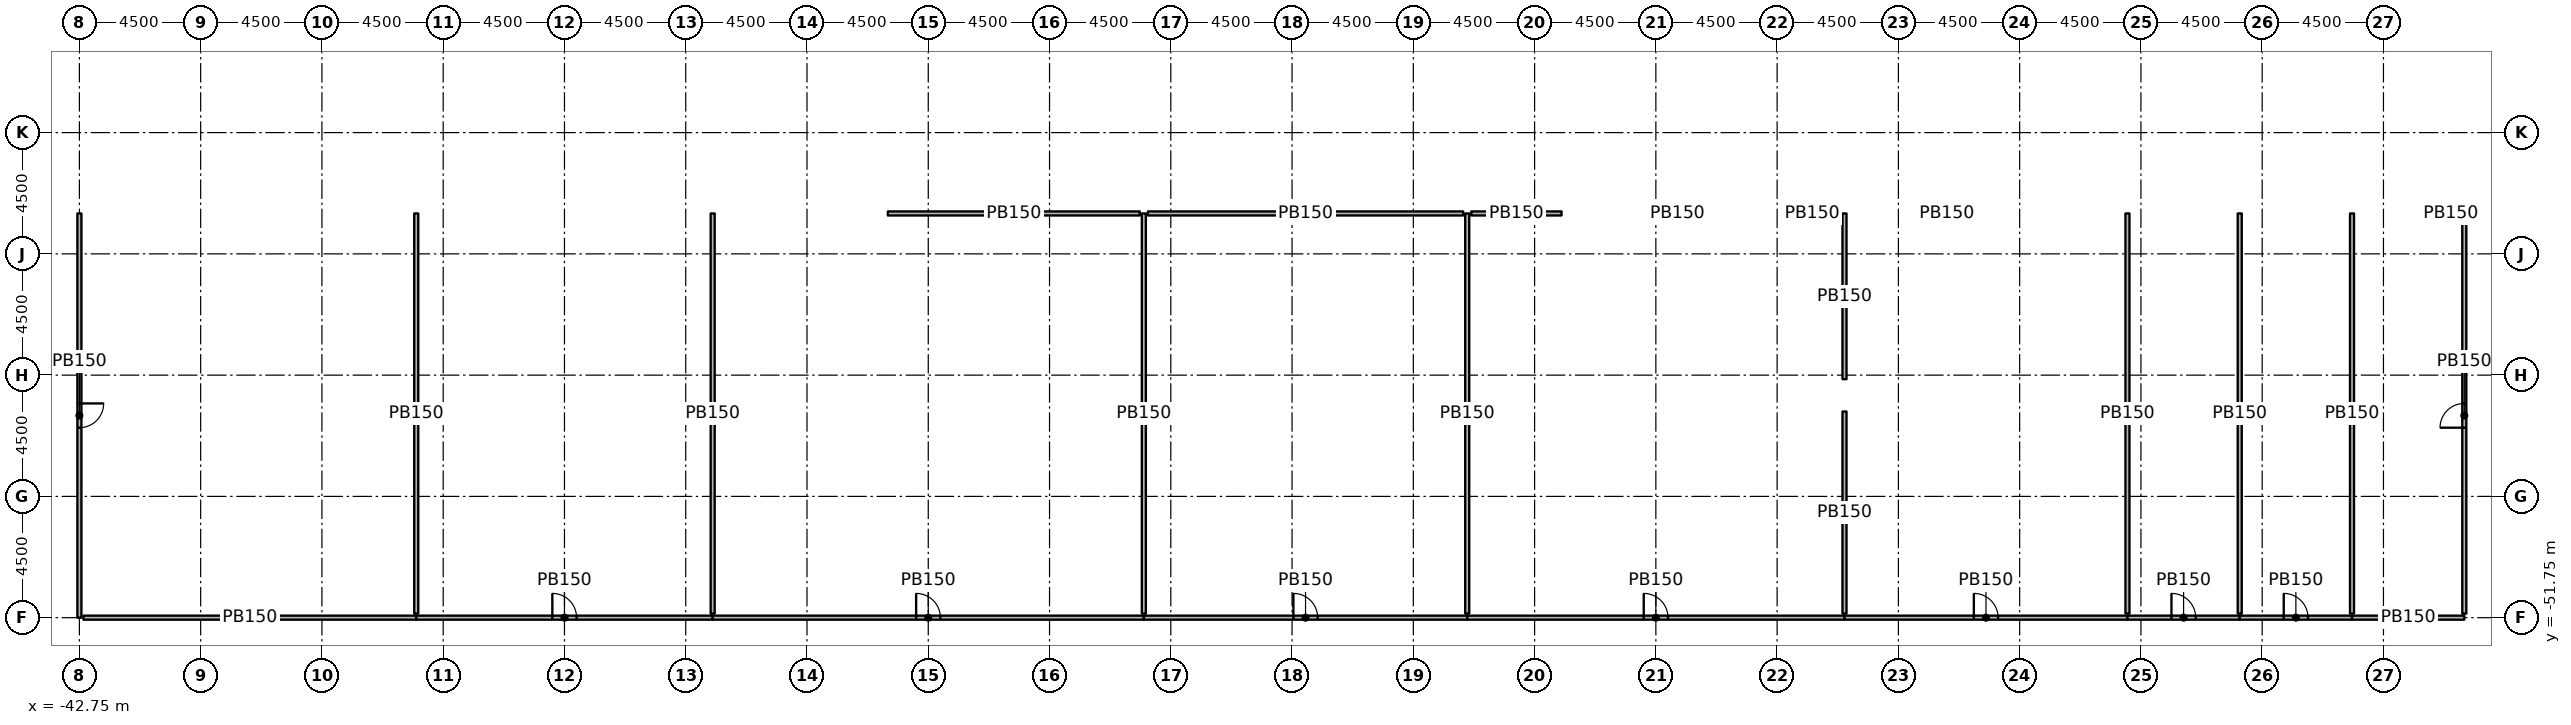
"""IFC4 building model, lengths in metres.
Left out: names, types, materials, properties, quantities, classifications, styles, units other than length and angle.
Written with IfcOpenShell. Run it as: python <this file> out.ifc"""

import sys

from ifc_helpers import new_model, si_unit, direction, frame, frame_2d, origin, origin_2d, place, context, subcontext, project, spatial, rectangle, extrude, element, fill, save


model = new_model("IFC4")
c1 = context("Model", 3, precision=1e-05, world=origin(), true_north=direction((0.0, 1.0)))
c2 = subcontext(c1, "Body", "Model", "MODEL_VIEW")
j1 = project(units=[si_unit("LENGTHUNIT", "METRE"), si_unit("PLANEANGLEUNIT", "RADIAN")], contexts=[c1])
p1 = place(None, origin())
s1 = spatial("IfcSite", under=j1, at=p1, CompositionType="ELEMENT")
p2 = place(p1, origin())
s2 = spatial("IfcBuilding", under=s1, at=p2, CompositionType="ELEMENT")
p3 = place(p2, frame((0.0, 0.0, -4.0)))
s3 = spatial("IfcBuildingStorey", under=s2, at=p3, CompositionType="ELEMENT", Elevation=-4.0)
for number, where, z_axis, x_axis in (
    (1, (-40.5, -43.5, 0.0), (0.0, 0.0, 1.0), (1.0, 0.0, 0.0)),
    (2, (-31.5, -43.5, 0.0), (0.0, 0.0, 1.0), (1.0, 0.0, 0.0)),
    (3, (-22.5, -43.5, 0.0), (0.0, 0.0, 1.0), (1.0, 0.0, 0.0)),
    (4, (-13.5, -43.5, 0.0), (0.0, 0.0, 1.0), (1.0, 0.0, 0.0)),
    (5, (-4.5, -43.5, 0.0), (0.0, 0.0, 1.0), (1.0, 0.0, 0.0)),
    (6, (-2.25, -33.11, 0.0), (0.0, 0.0, 1.0), (1.0, 0.0, 0.0)),
    (7, (2.25, -33.11, 0.0), (0.0, 0.0, 1.0), (1.0, 0.0, 0.0)),
    (8, (4.5, -43.5, 0.0), (0.0, 0.0, 1.0), (1.0, 0.0, 0.0)),
    (9, (13.5, -43.5, 0.0), (0.0, 0.0, 1.0), (1.0, 0.0, 0.0)),
    (10, (22.5, -43.5, 0.0), (0.0, 0.0, 1.0), (1.0, 0.0, 0.0)),
    (11, (31.5, -43.5, 0.0), (0.0, 0.0, 1.0), (1.0, 0.0, 0.0)),
    (12, (40.5, -43.5, 0.0), (0.0, 0.0, 1.0), (1.0, 0.0, 0.0)),
):
    element("IfcColumn", number, at=place(p3, frame(where, z_axis=z_axis, x_axis=x_axis)), inside=s3, PredefinedType="COLUMN", context=c2, shape_type="SweptSolid", body=[
        extrude(rectangle(XDim=1.2, YDim=1.2, at=origin_2d()), origin(), (0.0, 0.0, 1.0), 3.1),
    ])
p4 = place(p3, frame((-42.75, -36.75, 0.0), z_axis=(0.0, 0.0, 1.0), x_axis=(0.0, -1.0, 0.0)))
e13 = element("IfcWall", 13, at=p4, inside=s3, PredefinedType="PARTITIONING", context=c2, shape_type="SweptSolid", body=[
    extrude(rectangle(XDim=15.0, YDim=0.15, at=frame_2d((7.5, 0.0))), origin(), (0.0, 0.0, 1.0), 3.1),
])
p5 = place(p4, frame((7.05, 0.0, 0.0)))
e14 = element("IfcOpeningElement", 14, at=p5, cuts=e13, PredefinedType="OPENING", context=c2, shape_type="SweptSolid", body=[
    extrude(rectangle(XDim=0.9, YDim=2.1, at=frame_2d((0.45, 1.05))), frame((0.0, 0.085, 0.0), z_axis=(0.0, -1.0, 0.0), x_axis=(1.0, 0.0, 0.0)), (0.0, 0.0, 1.0), 0.17),
])
p6 = place(p3, frame((-42.6, -51.75, 0.0), z_axis=(0.0, 0.0, 1.0), x_axis=(1.0, 0.0, 0.0)))
e15 = element("IfcWall", 15, at=p6, inside=s3, PredefinedType="PARTITIONING", context=c2, shape_type="SweptSolid", body=[
    extrude(rectangle(XDim=12.35, YDim=0.15, at=frame_2d((6.175, 0.0))), origin(), (0.0, 0.0, 1.0), 3.1),
])
p7 = place(p3, frame((-30.25, -51.75, 0.0), z_axis=(0.0, 0.0, 1.0), x_axis=(1.0, 0.0, 0.0)))
e16 = element("IfcWall", 16, at=p7, inside=s3, PredefinedType="PARTITIONING", context=c2, shape_type="SweptSolid", body=[
    extrude(rectangle(XDim=11.0, YDim=0.15, at=frame_2d((5.5, 0.0))), origin(), (0.0, 0.0, 1.0), 3.1),
])
p8 = place(p7, frame((5.05, 0.0, 0.0)))
e17 = element("IfcOpeningElement", 17, at=p8, cuts=e16, PredefinedType="OPENING", context=c2, shape_type="SweptSolid", body=[
    extrude(rectangle(XDim=0.9, YDim=2.1, at=frame_2d((0.45, 1.05))), frame((0.0, 0.085, 0.0), z_axis=(0.0, -1.0, 0.0), x_axis=(1.0, 0.0, 0.0)), (0.0, 0.0, 1.0), 0.17),
])
p9 = place(p3, frame((-19.25, -51.75, 0.0), z_axis=(0.0, 0.0, 1.0), x_axis=(1.0, 0.0, 0.0)))
e18 = element("IfcWall", 18, at=p9, inside=s3, PredefinedType="PARTITIONING", context=c2, shape_type="SweptSolid", body=[
    extrude(rectangle(XDim=16.0, YDim=0.15, at=frame_2d((8.0, 0.0))), origin(), (0.0, 0.0, 1.0), 3.1),
])
p10 = place(p9, frame((7.55, 0.0, 0.0)))
e19 = element("IfcOpeningElement", 19, at=p10, cuts=e18, PredefinedType="OPENING", context=c2, shape_type="SweptSolid", body=[
    extrude(rectangle(XDim=0.9, YDim=2.1, at=frame_2d((0.45, 1.05))), frame((0.0, 0.085, 0.0), z_axis=(0.0, -1.0, 0.0), x_axis=(1.0, 0.0, 0.0)), (0.0, 0.0, 1.0), 0.17),
])
p11 = place(p3, frame((-3.25, -51.75, 0.0), z_axis=(0.0, 0.0, 1.0), x_axis=(1.0, 0.0, 0.0)))
e20 = element("IfcWall", 20, at=p11, inside=s3, PredefinedType="PARTITIONING", context=c2, shape_type="SweptSolid", body=[
    extrude(rectangle(XDim=12.0, YDim=0.15, at=frame_2d((6.0, 0.0))), origin(), (0.0, 0.0, 1.0), 3.1),
])
p12 = place(p11, frame((5.55, 0.0, 0.0)))
e21 = element("IfcOpeningElement", 21, at=p12, cuts=e20, PredefinedType="OPENING", context=c2, shape_type="SweptSolid", body=[
    extrude(rectangle(XDim=0.9, YDim=2.1, at=frame_2d((0.45, 1.05))), frame((0.0, 0.085, 0.0), z_axis=(0.0, -1.0, 0.0), x_axis=(1.0, 0.0, 0.0)), (0.0, 0.0, 1.0), 0.17),
])
p13 = place(p3, frame((8.75, -51.75, 0.0), z_axis=(0.0, 0.0, 1.0), x_axis=(1.0, 0.0, 0.0)))
e22 = element("IfcWall", 22, at=p13, inside=s3, PredefinedType="PARTITIONING", context=c2, shape_type="SweptSolid", body=[
    extrude(rectangle(XDim=14.0, YDim=0.15, at=frame_2d((7.0, 0.0))), origin(), (0.0, 0.0, 1.0), 3.1),
])
p14 = place(p13, frame((6.55, 0.0, 0.0)))
e23 = element("IfcOpeningElement", 23, at=p14, cuts=e22, PredefinedType="OPENING", context=c2, shape_type="SweptSolid", body=[
    extrude(rectangle(XDim=0.9, YDim=2.1, at=frame_2d((0.45, 1.05))), frame((0.0, 0.085, 0.0), z_axis=(0.0, -1.0, 0.0), x_axis=(1.0, 0.0, 0.0)), (0.0, 0.0, 1.0), 0.17),
])
p15 = place(p3, frame((22.75, -51.75, 0.0), z_axis=(0.0, 0.0, 1.0), x_axis=(1.0, 0.0, 0.0)))
e24 = element("IfcWall", 24, at=p15, inside=s3, PredefinedType="PARTITIONING", context=c2, shape_type="SweptSolid", body=[
    extrude(rectangle(XDim=10.5, YDim=0.15, at=frame_2d((5.25, 0.0))), origin(), (0.0, 0.0, 1.0), 3.1),
])
p16 = place(p15, frame((4.8, 0.0, 0.0)))
e25 = element("IfcOpeningElement", 25, at=p16, cuts=e24, PredefinedType="OPENING", context=c2, shape_type="SweptSolid", body=[
    extrude(rectangle(XDim=0.9, YDim=2.1, at=frame_2d((0.45, 1.05))), frame((0.0, 0.085, 0.0), z_axis=(0.0, -1.0, 0.0), x_axis=(1.0, 0.0, 0.0)), (0.0, 0.0, 1.0), 0.17),
])
p17 = place(p3, frame((33.25, -51.75, 0.0), z_axis=(0.0, 0.0, 1.0), x_axis=(1.0, 0.0, 0.0)))
e26 = element("IfcWall", 26, at=p17, inside=s3, PredefinedType="PARTITIONING", context=c2, shape_type="SweptSolid", body=[
    extrude(rectangle(XDim=4.167, YDim=0.15, at=frame_2d((2.083, 0.0))), origin(), (0.0, 0.0, 1.0), 3.1),
])
p18 = place(p17, frame((1.633, 0.0, 0.0)))
e27 = element("IfcOpeningElement", 27, at=p18, cuts=e26, PredefinedType="OPENING", context=c2, shape_type="SweptSolid", body=[
    extrude(rectangle(XDim=0.9, YDim=2.1, at=frame_2d((0.45, 1.05))), frame((0.0, 0.085, 0.0), z_axis=(0.0, -1.0, 0.0), x_axis=(1.0, 0.0, 0.0)), (0.0, 0.0, 1.0), 0.17),
])
p19 = place(p3, frame((37.417, -51.75, 0.0), z_axis=(0.0, 0.0, 1.0), x_axis=(1.0, 0.0, 0.0)))
e28 = element("IfcWall", 28, at=p19, inside=s3, PredefinedType="PARTITIONING", context=c2, shape_type="SweptSolid", body=[
    extrude(rectangle(XDim=4.167, YDim=0.15, at=frame_2d((2.083, 0.0))), origin(), (0.0, 0.0, 1.0), 3.1),
])
p20 = place(p19, frame((1.633, 0.0, 0.0)))
e29 = element("IfcOpeningElement", 29, at=p20, cuts=e28, PredefinedType="OPENING", context=c2, shape_type="SweptSolid", body=[
    extrude(rectangle(XDim=0.9, YDim=2.1, at=frame_2d((0.45, 1.05))), frame((0.0, 0.085, 0.0), z_axis=(0.0, -1.0, 0.0), x_axis=(1.0, 0.0, 0.0)), (0.0, 0.0, 1.0), 0.17),
])
p21 = place(p3, frame((41.583, -51.75, 0.0), z_axis=(0.0, 0.0, 1.0), x_axis=(1.0, 0.0, 0.0)))
e30 = element("IfcWall", 30, at=p21, inside=s3, PredefinedType="PARTITIONING", context=c2, shape_type="SweptSolid", body=[
    extrude(rectangle(XDim=4.167, YDim=0.15, at=frame_2d((2.083, 0.0))), origin(), (0.0, 0.0, 1.0), 3.1),
])
for number, where, z_axis, x_axis in (
    (31, (-30.25, -36.75, 0.0), (0.0, 0.0, 1.0), (0.0, -1.0, 0.0)),
    (32, (-19.25, -36.75, 0.0), (0.0, 0.0, 1.0), (0.0, -1.0, 0.0)),
    (33, (-3.25, -36.75, 0.0), (0.0, 0.0, 1.0), (0.0, -1.0, 0.0)),
):
    element("IfcWall", number, at=place(p3, frame(where, z_axis=z_axis, x_axis=x_axis)), inside=s3, PredefinedType="PARTITIONING", context=c2, shape_type="SweptSolid", body=[
        extrude(rectangle(XDim=14.85, YDim=0.15, at=frame_2d((7.425, 0.0))), origin(), (0.0, 0.0, 1.0), 3.1),
    ])
p22 = place(p3, frame((-12.75, -36.75, 0.0), z_axis=(0.0, 0.0, 1.0), x_axis=(1.0, 0.0, 0.0)))
e34 = element("IfcWall", 34, at=p22, inside=s3, PredefinedType="PARTITIONING", context=c2, shape_type="SweptSolid", body=[
    extrude(rectangle(XDim=9.35, YDim=0.15, at=frame_2d((4.675, 0.0))), origin(), (0.0, 0.0, 1.0), 3.1),
])
p23 = place(p3, frame((8.75, -36.75, 0.0), z_axis=(0.0, 0.0, 1.0), x_axis=(0.0, -1.0, 0.0)))
e35 = element("IfcWall", 35, at=p23, inside=s3, PredefinedType="PARTITIONING", context=c2, shape_type="SweptSolid", body=[
    extrude(rectangle(XDim=14.85, YDim=0.15, at=frame_2d((7.425, 0.0))), origin(), (0.0, 0.0, 1.0), 3.1),
])
p24 = place(p3, frame((-3.1, -36.75, 0.0), z_axis=(0.0, 0.0, 1.0), x_axis=(1.0, 0.0, 0.0)))
e36 = element("IfcWall", 36, at=p24, inside=s3, PredefinedType="PARTITIONING", context=c2, shape_type="SweptSolid", body=[
    extrude(rectangle(XDim=11.7, YDim=0.15, at=frame_2d((5.85, 0.0))), origin(), (0.0, 0.0, 1.0), 3.1),
])
p25 = place(p3, frame((22.75, -36.75, 0.0), z_axis=(0.0, 0.0, 1.0), x_axis=(0.0, -1.0, 0.0)))
e37 = element("IfcWall", 37, at=p25, inside=s3, PredefinedType="PARTITIONING", context=c2, shape_type="SweptSolid", body=[
    extrude(rectangle(XDim=6.15, YDim=0.15, at=frame_2d((3.075, 0.0))), origin(), (0.0, 0.0, 1.0), 3.1),
])
p26 = place(p3, frame((22.75, -44.1, 0.0), z_axis=(0.0, 0.0, 1.0), x_axis=(0.0, -1.0, 0.0)))
e38 = element("IfcWall", 38, at=p26, inside=s3, PredefinedType="PARTITIONING", context=c2, shape_type="SweptSolid", body=[
    extrude(rectangle(XDim=7.5, YDim=0.15, at=frame_2d((3.75, 0.0))), origin(), (0.0, 0.0, 1.0), 3.1),
])
p27 = place(p3, frame((8.9, -36.75, 0.0), z_axis=(0.0, 0.0, 1.0), x_axis=(1.0, 0.0, 0.0)))
e39 = element("IfcWall", 39, at=p27, inside=s3, PredefinedType="PARTITIONING", context=c2, shape_type="SweptSolid", body=[
    extrude(rectangle(XDim=3.35, YDim=0.15, at=frame_2d((1.675, 0.0))), origin(), (0.0, 0.0, 1.0), 3.1),
])
for number, where, z_axis, x_axis in (
    (40, (15.85, -36.75, 0.0), (0.0, 0.0, 1.0), (1.0, 0.0, 0.0)),
    (41, (20.85, -36.75, 0.0), (0.0, 0.0, 1.0), (1.0, 0.0, 0.0)),
):
    element("IfcWall", number, at=place(p3, frame(where, z_axis=z_axis, x_axis=x_axis)), inside=s3, PredefinedType="PARTITIONING", context=c2, shape_type="SweptSolid", body=[
        extrude(rectangle(XDim=1.4, YDim=0.15, at=frame_2d((0.7, 0.0))), origin(), (0.0, 0.0, 1.0), 3.1),
    ])
p28 = place(p3, frame((33.25, -36.75, 0.0), z_axis=(0.0, 0.0, 1.0), x_axis=(0.0, -1.0, 0.0)))
e42 = element("IfcWall", 42, at=p28, inside=s3, PredefinedType="PARTITIONING", context=c2, shape_type="SweptSolid", body=[
    extrude(rectangle(XDim=14.85, YDim=0.15, at=frame_2d((7.425, 0.0))), origin(), (0.0, 0.0, 1.0), 3.1),
])
p29 = place(p3, frame((25.85, -36.75, 0.0), z_axis=(0.0, 0.0, 1.0), x_axis=(1.0, 0.0, 0.0)))
e43 = element("IfcWall", 43, at=p29, inside=s3, PredefinedType="PARTITIONING", context=c2, shape_type="SweptSolid", body=[
    extrude(rectangle(XDim=1.4, YDim=0.15, at=frame_2d((0.7, 0.0))), origin(), (0.0, 0.0, 1.0), 3.1),
])
for number, where, z_axis, x_axis in (
    (44, (37.417, -36.75, 0.0), (0.0, 0.0, 1.0), (0.0, -1.0, 0.0)),
    (45, (41.583, -36.75, 0.0), (0.0, 0.0, 1.0), (0.0, -1.0, 0.0)),
):
    element("IfcWall", number, at=place(p3, frame(where, z_axis=z_axis, x_axis=x_axis)), inside=s3, PredefinedType="PARTITIONING", context=c2, shape_type="SweptSolid", body=[
        extrude(rectangle(XDim=14.85, YDim=0.15, at=frame_2d((7.425, 0.0))), origin(), (0.0, 0.0, 1.0), 3.1),
    ])
p30 = place(p3, frame((44.75, -36.75, 0.0), z_axis=(0.0, 0.0, 1.0), x_axis=(1.0, 0.0, 0.0)))
e46 = element("IfcWall", 46, at=p30, inside=s3, PredefinedType="PARTITIONING", context=c2, shape_type="SweptSolid", body=[
    extrude(rectangle(XDim=1.0, YDim=0.15, at=frame_2d((0.5, 0.0))), origin(), (0.0, 0.0, 1.0), 3.1),
])
p31 = place(p3, frame((45.75, -51.6, 0.0), z_axis=(0.0, 0.0, 1.0), x_axis=(0.0, 1.0, 0.0)))
e47 = element("IfcWall", 47, at=p31, inside=s3, PredefinedType="PARTITIONING", context=c2, shape_type="SweptSolid", body=[
    extrude(rectangle(XDim=14.7, YDim=0.15, at=frame_2d((7.35, 0.0))), origin(), (0.0, 0.0, 1.0), 3.1),
])
p32 = place(p31, frame((6.9, 0.0, 0.0)))
e48 = element("IfcOpeningElement", 48, at=p32, cuts=e47, PredefinedType="OPENING", context=c2, shape_type="SweptSolid", body=[
    extrude(rectangle(XDim=0.9, YDim=2.1, at=frame_2d((0.45, 1.05))), frame((0.0, 0.085, 0.0), z_axis=(0.0, -1.0, 0.0), x_axis=(1.0, 0.0, 0.0)), (0.0, 0.0, 1.0), 0.17),
])
p33 = place(p5, origin())
e49 = element("IfcDoor", 49, at=p33, inside=s3, OperationType="SINGLE_SWING_LEFT", PredefinedType="DOOR", context=c2, shape_type="SweptSolid", body=[
    extrude(rectangle(XDim=0.9, YDim=2.1, at=frame_2d((0.45, 1.05))), frame((0.0, 0.025, 0.0), z_axis=(0.0, -1.0, 0.0), x_axis=(1.0, 0.0, 0.0)), (0.0, 0.0, 1.0), 0.05),
])
fill(e14, e49)
p34 = place(p8, origin())
e50 = element("IfcDoor", 50, at=p34, inside=s3, OperationType="SINGLE_SWING_LEFT", PredefinedType="DOOR", context=c2, shape_type="SweptSolid", body=[
    extrude(rectangle(XDim=0.9, YDim=2.1, at=frame_2d((0.45, 1.05))), frame((0.0, 0.025, 0.0), z_axis=(0.0, -1.0, 0.0), x_axis=(1.0, 0.0, 0.0)), (0.0, 0.0, 1.0), 0.05),
])
fill(e17, e50)
p35 = place(p10, origin())
e51 = element("IfcDoor", 51, at=p35, inside=s3, OperationType="SINGLE_SWING_LEFT", PredefinedType="DOOR", context=c2, shape_type="SweptSolid", body=[
    extrude(rectangle(XDim=0.9, YDim=2.1, at=frame_2d((0.45, 1.05))), frame((0.0, 0.025, 0.0), z_axis=(0.0, -1.0, 0.0), x_axis=(1.0, 0.0, 0.0)), (0.0, 0.0, 1.0), 0.05),
])
fill(e19, e51)
p36 = place(p12, origin())
e52 = element("IfcDoor", 52, at=p36, inside=s3, OperationType="SINGLE_SWING_LEFT", PredefinedType="DOOR", context=c2, shape_type="SweptSolid", body=[
    extrude(rectangle(XDim=0.9, YDim=2.1, at=frame_2d((0.45, 1.05))), frame((0.0, 0.025, 0.0), z_axis=(0.0, -1.0, 0.0), x_axis=(1.0, 0.0, 0.0)), (0.0, 0.0, 1.0), 0.05),
])
fill(e21, e52)
p37 = place(p14, origin())
e53 = element("IfcDoor", 53, at=p37, inside=s3, OperationType="SINGLE_SWING_LEFT", PredefinedType="DOOR", context=c2, shape_type="SweptSolid", body=[
    extrude(rectangle(XDim=0.9, YDim=2.1, at=frame_2d((0.45, 1.05))), frame((0.0, 0.025, 0.0), z_axis=(0.0, -1.0, 0.0), x_axis=(1.0, 0.0, 0.0)), (0.0, 0.0, 1.0), 0.05),
])
fill(e23, e53)
p38 = place(p16, origin())
e54 = element("IfcDoor", 54, at=p38, inside=s3, OperationType="SINGLE_SWING_LEFT", PredefinedType="DOOR", context=c2, shape_type="SweptSolid", body=[
    extrude(rectangle(XDim=0.9, YDim=2.1, at=frame_2d((0.45, 1.05))), frame((0.0, 0.025, 0.0), z_axis=(0.0, -1.0, 0.0), x_axis=(1.0, 0.0, 0.0)), (0.0, 0.0, 1.0), 0.05),
])
fill(e25, e54)
p39 = place(p18, origin())
e55 = element("IfcDoor", 55, at=p39, inside=s3, OperationType="SINGLE_SWING_LEFT", PredefinedType="DOOR", context=c2, shape_type="SweptSolid", body=[
    extrude(rectangle(XDim=0.9, YDim=2.1, at=frame_2d((0.45, 1.05))), frame((0.0, 0.025, 0.0), z_axis=(0.0, -1.0, 0.0), x_axis=(1.0, 0.0, 0.0)), (0.0, 0.0, 1.0), 0.05),
])
fill(e27, e55)
p40 = place(p20, origin())
e56 = element("IfcDoor", 56, at=p40, inside=s3, OperationType="SINGLE_SWING_LEFT", PredefinedType="DOOR", context=c2, shape_type="SweptSolid", body=[
    extrude(rectangle(XDim=0.9, YDim=2.1, at=frame_2d((0.45, 1.05))), frame((0.0, 0.025, 0.0), z_axis=(0.0, -1.0, 0.0), x_axis=(1.0, 0.0, 0.0)), (0.0, 0.0, 1.0), 0.05),
])
fill(e29, e56)
p41 = place(p32, origin())
e57 = element("IfcDoor", 57, at=p41, inside=s3, OperationType="SINGLE_SWING_LEFT", PredefinedType="DOOR", context=c2, shape_type="SweptSolid", body=[
    extrude(rectangle(XDim=0.9, YDim=2.1, at=frame_2d((0.45, 1.05))), frame((0.0, 0.025, 0.0), z_axis=(0.0, -1.0, 0.0), x_axis=(1.0, 0.0, 0.0)), (0.0, 0.0, 1.0), 0.05),
])
fill(e48, e57)
save(model, sys.argv[1])
